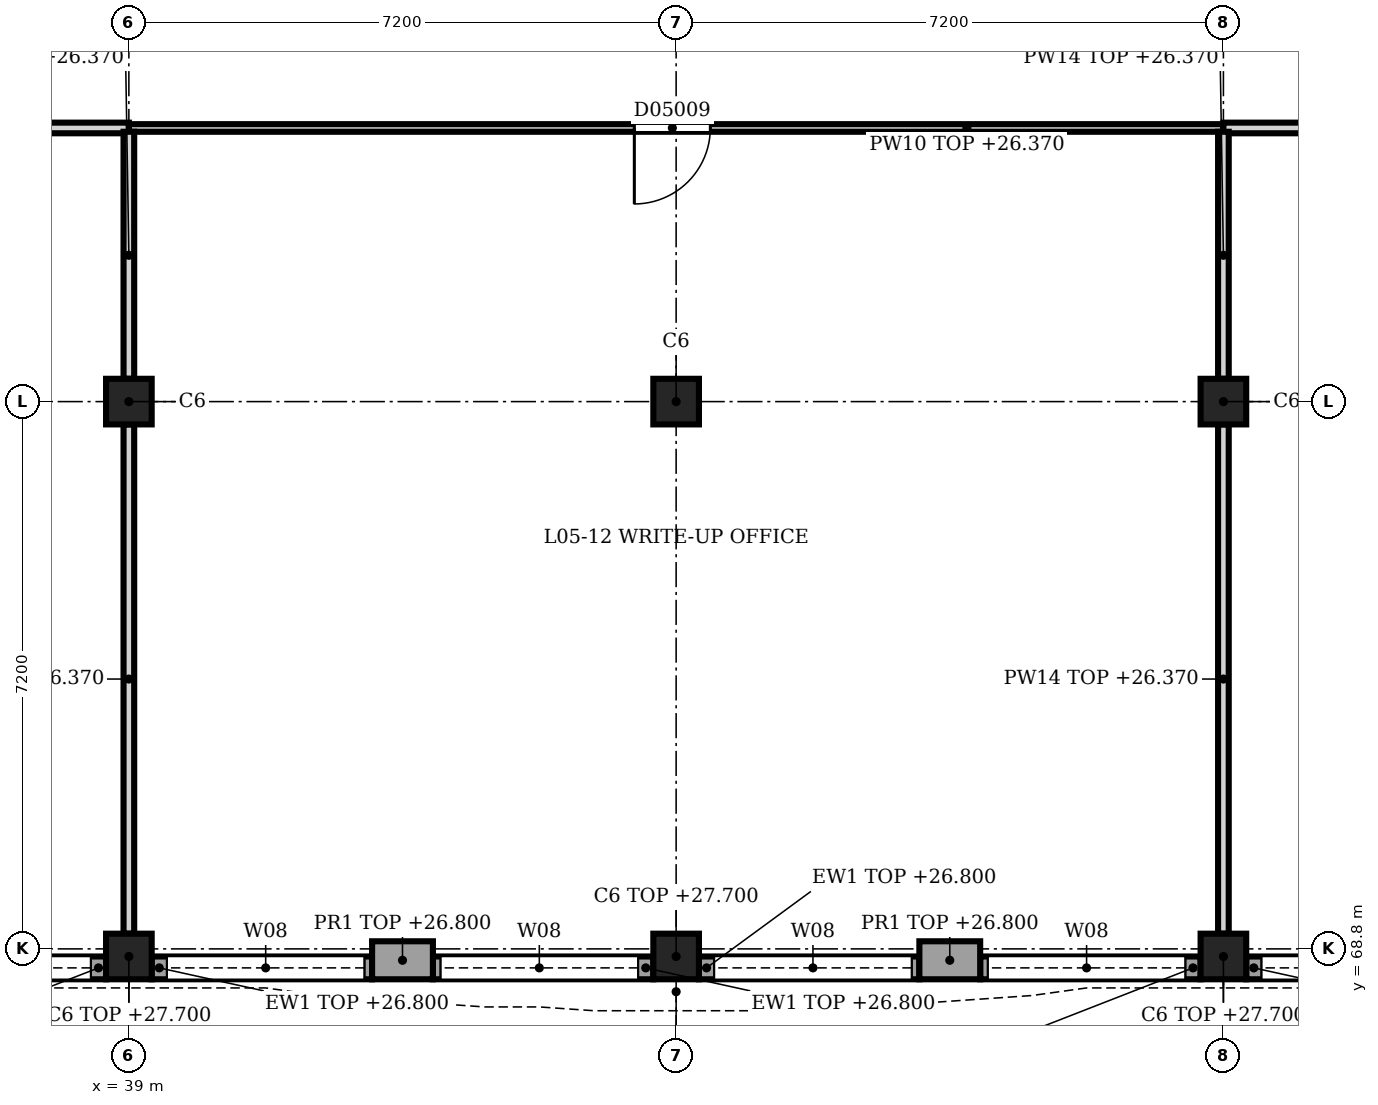
"""IFC4 building model, lengths in metres.
Left out: names, types, materials, properties, quantities, classifications, styles, units other than length and angle.
Written with IfcOpenShell. Run it as: python <this file> out.ifc"""

import sys

from ifc_helpers import new_model, si_unit, direction, frame, frame_2d, origin, origin_2d, place, context, subcontext, project, spatial, rectangle, extrude, element, fill, save


model = new_model("IFC4")
c1 = context("Model", 3, precision=1e-05, world=origin(), true_north=direction((0.0, 1.0)))
c2 = subcontext(c1, "Body", "Model", "MODEL_VIEW")
j1 = project(units=[si_unit("LENGTHUNIT", "METRE"), si_unit("PLANEANGLEUNIT", "RADIAN")], contexts=[c1])
p1 = place(None, origin())
s1 = spatial("IfcSite", under=j1, at=p1, CompositionType="ELEMENT")
p2 = place(p1, origin())
s2 = spatial("IfcBuilding", under=s1, at=p2, CompositionType="ELEMENT")
p3 = place(p2, frame((0.0, 0.0, 23.4)))
s3 = spatial("IfcBuildingStorey", under=s2, at=p3, CompositionType="ELEMENT", Elevation=23.4)
p4 = place(p3, frame((39.0, 68.7, 0.0), z_axis=(0.0, 0.0, 1.0), x_axis=(1.0, 0.0, 0.0)))
e1 = element("IfcColumn", 1, at=p4, inside=s3, PredefinedType="COLUMN", context=c2, shape_type="SweptSolid", body=[
    extrude(rectangle(XDim=0.6, YDim=0.6, at=origin_2d()), origin(), (0.0, 0.0, 1.0), 4.3),
])
p5 = place(p3, frame((39.0, 76.0, 0.0), z_axis=(0.0, 0.0, 1.0), x_axis=(1.0, 0.0, 0.0)))
e2 = element("IfcColumn", 2, at=p5, inside=s3, PredefinedType="COLUMN", context=c2, shape_type="SweptSolid", body=[
    extrude(rectangle(XDim=0.6, YDim=0.6, at=origin_2d()), origin(), (0.0, 0.0, 1.0), 4.5),
])
p6 = place(p3, frame((46.2, 68.7, 0.0), z_axis=(0.0, 0.0, 1.0), x_axis=(1.0, 0.0, 0.0)))
e3 = element("IfcColumn", 3, at=p6, inside=s3, PredefinedType="COLUMN", context=c2, shape_type="SweptSolid", body=[
    extrude(rectangle(XDim=0.6, YDim=0.6, at=origin_2d()), origin(), (0.0, 0.0, 1.0), 4.3),
])
p7 = place(p3, frame((46.2, 76.0, 0.0), z_axis=(0.0, 0.0, 1.0), x_axis=(1.0, 0.0, 0.0)))
e4 = element("IfcColumn", 4, at=p7, inside=s3, PredefinedType="COLUMN", context=c2, shape_type="SweptSolid", body=[
    extrude(rectangle(XDim=0.6, YDim=0.6, at=origin_2d()), origin(), (0.0, 0.0, 1.0), 4.5),
])
p8 = place(p3, frame((53.4, 68.7, 0.0), z_axis=(0.0, 0.0, 1.0), x_axis=(1.0, 0.0, 0.0)))
e5 = element("IfcColumn", 5, at=p8, inside=s3, PredefinedType="COLUMN", context=c2, shape_type="SweptSolid", body=[
    extrude(rectangle(XDim=0.6, YDim=0.6, at=origin_2d()), origin(), (0.0, 0.0, 1.0), 4.3),
])
p9 = place(p3, frame((53.4, 76.0, 0.0), z_axis=(0.0, 0.0, 1.0), x_axis=(1.0, 0.0, 0.0)))
e6 = element("IfcColumn", 6, at=p9, inside=s3, PredefinedType="COLUMN", context=c2, shape_type="SweptSolid", body=[
    extrude(rectangle(XDim=0.6, YDim=0.6, at=origin_2d()), origin(), (0.0, 0.0, 1.0), 4.5),
])
for number, where, z_axis, x_axis in (
    (7, (50.2, 68.65, 0.0), (0.0, 0.0, 1.0), (-1.0, 0.0, 0.0)),
    (8, (43.0, 68.65, 0.0), (0.0, 0.0, 1.0), (-1.0, 0.0, 0.0)),
):
    element("IfcWall", number, at=place(p3, frame(where, z_axis=z_axis, x_axis=x_axis)), inside=s3, PredefinedType="SOLIDWALL", context=c2, shape_type="SweptSolid", body=[
        extrude(rectangle(XDim=0.8, YDim=0.5, at=frame_2d((0.4, 0.0))), origin(), (0.0, 0.0, 1.0), 3.4),
    ])
p10 = place(p3, frame((56.6, 68.55, 0.0), z_axis=(0.0, 0.0, 1.0), x_axis=(-1.0, 0.0, 0.0)))
e9 = element("IfcWall", 9, at=p10, inside=s3, PredefinedType="SOLIDWALL", context=c2, shape_type="SweptSolid", body=[
    extrude(rectangle(XDim=2.9, YDim=0.3, at=frame_2d((1.45, 0.0))), origin(), (0.0, 0.0, 1.0), 3.4),
])
p11 = place(p10, frame((0.1, 0.0, 1.2)))
e10 = element("IfcOpeningElement", 10, at=p11, cuts=e9, PredefinedType="OPENING", context=c2, shape_type="SweptSolid", body=[
    extrude(rectangle(XDim=2.6, YDim=2.1, at=frame_2d((1.3, 1.05))), frame((0.0, 0.16, 0.0), z_axis=(0.0, -1.0, 0.0), x_axis=(1.0, 0.0, 0.0)), (0.0, 0.0, 1.0), 0.32),
])
p12 = place(p3, frame((53.1, 68.55, 0.0), z_axis=(0.0, 0.0, 1.0), x_axis=(-1.0, 0.0, 0.0)))
e11 = element("IfcWall", 11, at=p12, inside=s3, PredefinedType="SOLIDWALL", context=c2, shape_type="SweptSolid", body=[
    extrude(rectangle(XDim=2.9, YDim=0.3, at=frame_2d((1.45, 0.0))), origin(), (0.0, 0.0, 1.0), 3.4),
])
p13 = place(p12, frame((0.2, 0.0, 1.2)))
e12 = element("IfcOpeningElement", 12, at=p13, cuts=e11, PredefinedType="OPENING", context=c2, shape_type="SweptSolid", body=[
    extrude(rectangle(XDim=2.6, YDim=2.1, at=frame_2d((1.3, 1.05))), frame((0.0, 0.16, 0.0), z_axis=(0.0, -1.0, 0.0), x_axis=(1.0, 0.0, 0.0)), (0.0, 0.0, 1.0), 0.32),
])
p14 = place(p3, frame((49.4, 68.55, 0.0), z_axis=(0.0, 0.0, 1.0), x_axis=(-1.0, 0.0, 0.0)))
e13 = element("IfcWall", 13, at=p14, inside=s3, PredefinedType="SOLIDWALL", context=c2, shape_type="SweptSolid", body=[
    extrude(rectangle(XDim=2.9, YDim=0.3, at=frame_2d((1.45, 0.0))), origin(), (0.0, 0.0, 1.0), 3.4),
])
p15 = place(p14, frame((0.1, 0.0, 1.2)))
e14 = element("IfcOpeningElement", 14, at=p15, cuts=e13, PredefinedType="OPENING", context=c2, shape_type="SweptSolid", body=[
    extrude(rectangle(XDim=2.6, YDim=2.1, at=frame_2d((1.3, 1.05))), frame((0.0, 0.16, 0.0), z_axis=(0.0, -1.0, 0.0), x_axis=(1.0, 0.0, 0.0)), (0.0, 0.0, 1.0), 0.32),
])
p16 = place(p3, frame((45.9, 68.55, 0.0), z_axis=(0.0, 0.0, 1.0), x_axis=(-1.0, 0.0, 0.0)))
e15 = element("IfcWall", 15, at=p16, inside=s3, PredefinedType="SOLIDWALL", context=c2, shape_type="SweptSolid", body=[
    extrude(rectangle(XDim=2.9, YDim=0.3, at=frame_2d((1.45, 0.0))), origin(), (0.0, 0.0, 1.0), 3.4),
])
p17 = place(p16, frame((0.2, 0.0, 1.2)))
e16 = element("IfcOpeningElement", 16, at=p17, cuts=e15, PredefinedType="OPENING", context=c2, shape_type="SweptSolid", body=[
    extrude(rectangle(XDim=2.6, YDim=2.1, at=frame_2d((1.3, 1.05))), frame((0.0, 0.16, 0.0), z_axis=(0.0, -1.0, 0.0), x_axis=(1.0, 0.0, 0.0)), (0.0, 0.0, 1.0), 0.32),
])
p18 = place(p3, frame((42.2, 68.55, 0.0), z_axis=(0.0, 0.0, 1.0), x_axis=(-1.0, 0.0, 0.0)))
e17 = element("IfcWall", 17, at=p18, inside=s3, PredefinedType="SOLIDWALL", context=c2, shape_type="SweptSolid", body=[
    extrude(rectangle(XDim=2.9, YDim=0.3, at=frame_2d((1.45, 0.0))), origin(), (0.0, 0.0, 1.0), 3.4),
])
p19 = place(p18, frame((0.1, 0.0, 1.2)))
e18 = element("IfcOpeningElement", 18, at=p19, cuts=e17, PredefinedType="OPENING", context=c2, shape_type="SweptSolid", body=[
    extrude(rectangle(XDim=2.6, YDim=2.1, at=frame_2d((1.3, 1.05))), frame((0.0, 0.16, 0.0), z_axis=(0.0, -1.0, 0.0), x_axis=(1.0, 0.0, 0.0)), (0.0, 0.0, 1.0), 0.32),
])
p20 = place(p3, frame((38.7, 68.55, 0.0), z_axis=(0.0, 0.0, 1.0), x_axis=(-1.0, 0.0, 0.0)))
e19 = element("IfcWall", 19, at=p20, inside=s3, PredefinedType="SOLIDWALL", context=c2, shape_type="SweptSolid", body=[
    extrude(rectangle(XDim=2.9, YDim=0.3, at=frame_2d((1.45, 0.0))), origin(), (0.0, 0.0, 1.0), 3.4),
])
p21 = place(p20, frame((0.2, 0.0, 1.2)))
e20 = element("IfcOpeningElement", 20, at=p21, cuts=e19, PredefinedType="OPENING", context=c2, shape_type="SweptSolid", body=[
    extrude(rectangle(XDim=2.6, YDim=2.1, at=frame_2d((1.3, 1.05))), frame((0.0, 0.16, 0.0), z_axis=(0.0, -1.0, 0.0), x_axis=(1.0, 0.0, 0.0)), (0.0, 0.0, 1.0), 0.32),
])
p22 = place(p3, frame((39.0, 79.6, 0.0), z_axis=(0.0, 0.0, 1.0), x_axis=(-1.0, 0.0, 0.0)))
e21 = element("IfcWall", 21, at=p22, inside=s3, PredefinedType="PARTITIONING", context=c2, shape_type="SweptSolid", body=[
    extrude(rectangle(XDim=18.0, YDim=0.14, at=frame_2d((9.0, 0.0))), origin(), (0.0, 0.0, 1.0), 2.97),
])
p23 = place(p22, frame((8.45, 0.0, 0.0)))
e22 = element("IfcOpeningElement", 22, at=p23, cuts=e21, PredefinedType="OPENING", context=c2, shape_type="SweptSolid", body=[
    extrude(rectangle(XDim=1.2, YDim=2.1, at=frame_2d((0.6, 1.05))), frame((0.0, 0.08, 0.0), z_axis=(0.0, -1.0, 0.0), x_axis=(1.0, 0.0, 0.0)), (0.0, 0.0, 1.0), 0.16),
])
p24 = place(p3, frame((53.4, 79.6, 0.0), z_axis=(0.0, 0.0, 1.0), x_axis=(-1.0, 0.0, 0.0)))
e23 = element("IfcWall", 23, at=p24, inside=s3, PredefinedType="PARTITIONING", context=c2, shape_type="SweptSolid", body=[
    extrude(rectangle(XDim=14.4, YDim=0.1, at=frame_2d((7.2, 0.0))), origin(), (0.0, 0.0, 1.0), 2.97),
])
p25 = place(p24, frame((6.75, 0.0, 0.0)))
e24 = element("IfcOpeningElement", 24, at=p25, cuts=e23, PredefinedType="OPENING", context=c2, shape_type="SweptSolid", body=[
    extrude(rectangle(XDim=1.0, YDim=2.1, at=frame_2d((0.5, 1.05))), frame((0.0, 0.06, 0.0), z_axis=(0.0, -1.0, 0.0), x_axis=(1.0, 0.0, 0.0)), (0.0, 0.0, 1.0), 0.12),
])
p26 = place(p3, frame((67.8, 79.6, 0.0), z_axis=(0.0, 0.0, 1.0), x_axis=(-1.0, 0.0, 0.0)))
e25 = element("IfcWall", 25, at=p26, inside=s3, PredefinedType="PARTITIONING", context=c2, shape_type="SweptSolid", body=[
    extrude(rectangle(XDim=14.4, YDim=0.14, at=frame_2d((7.2, 0.0))), origin(), (0.0, 0.0, 1.0), 2.97),
])
p27 = place(p26, frame((6.65, 0.0, 0.0)))
e26 = element("IfcOpeningElement", 26, at=p27, cuts=e25, PredefinedType="OPENING", context=c2, shape_type="SweptSolid", body=[
    extrude(rectangle(XDim=1.2, YDim=2.1, at=frame_2d((0.6, 1.05))), frame((0.0, 0.08, 0.0), z_axis=(0.0, -1.0, 0.0), x_axis=(1.0, 0.0, 0.0)), (0.0, 0.0, 1.0), 0.16),
])
p28 = place(p3, frame((39.0, 69.0, 0.0), z_axis=(0.0, 0.0, 1.0), x_axis=(0.0, 1.0, 0.0)))
e27 = element("IfcWall", 27, at=p28, inside=s3, PredefinedType="PARTITIONING", context=c2, shape_type="SweptSolid", body=[
    extrude(rectangle(XDim=6.7, YDim=0.14, at=frame_2d((3.35, 0.0))), origin(), (0.0, 0.0, 1.0), 2.97),
])
p29 = place(p3, frame((39.0, 76.3, 0.0), z_axis=(0.0, 0.0, 1.0), x_axis=(0.0, 1.0, 0.0)))
e28 = element("IfcWall", 28, at=p29, inside=s3, PredefinedType="PARTITIONING", context=c2, shape_type="SweptSolid", body=[
    extrude(rectangle(XDim=3.25, YDim=0.14, at=frame_2d((1.625, 0.0))), origin(), (0.0, 0.0, 1.0), 2.97),
])
p30 = place(p3, frame((53.4, 69.0, 0.0), z_axis=(0.0, 0.0, 1.0), x_axis=(0.0, 1.0, 0.0)))
e29 = element("IfcWall", 29, at=p30, inside=s3, PredefinedType="PARTITIONING", context=c2, shape_type="SweptSolid", body=[
    extrude(rectangle(XDim=6.7, YDim=0.14, at=frame_2d((3.35, 0.0))), origin(), (0.0, 0.0, 1.0), 2.97),
])
p31 = place(p3, frame((53.4, 76.3, 0.0), z_axis=(0.0, 0.0, 1.0), x_axis=(0.0, 1.0, 0.0)))
e30 = element("IfcWall", 30, at=p31, inside=s3, PredefinedType="PARTITIONING", context=c2, shape_type="SweptSolid", body=[
    extrude(rectangle(XDim=3.25, YDim=0.14, at=frame_2d((1.625, 0.0))), origin(), (0.0, 0.0, 1.0), 2.97),
])
p32 = place(p11, origin())
e31 = element("IfcWindow", 31, at=p32, inside=s3, PartitioningType="SINGLE_PANEL", PredefinedType="WINDOW", context=c2, shape_type="SweptSolid", body=[
    extrude(rectangle(XDim=2.6, YDim=2.1, at=frame_2d((1.3, 1.05))), frame((0.0, 0.03, 0.0), z_axis=(0.0, -1.0, 0.0), x_axis=(1.0, 0.0, 0.0)), (0.0, 0.0, 1.0), 0.06),
])
fill(e10, e31)
p33 = place(p13, origin())
e32 = element("IfcWindow", 32, at=p33, inside=s3, PartitioningType="SINGLE_PANEL", PredefinedType="WINDOW", context=c2, shape_type="SweptSolid", body=[
    extrude(rectangle(XDim=2.6, YDim=2.1, at=frame_2d((1.3, 1.05))), frame((0.0, 0.03, 0.0), z_axis=(0.0, -1.0, 0.0), x_axis=(1.0, 0.0, 0.0)), (0.0, 0.0, 1.0), 0.06),
])
fill(e12, e32)
p34 = place(p15, origin())
e33 = element("IfcWindow", 33, at=p34, inside=s3, PartitioningType="SINGLE_PANEL", PredefinedType="WINDOW", context=c2, shape_type="SweptSolid", body=[
    extrude(rectangle(XDim=2.6, YDim=2.1, at=frame_2d((1.3, 1.05))), frame((0.0, 0.03, 0.0), z_axis=(0.0, -1.0, 0.0), x_axis=(1.0, 0.0, 0.0)), (0.0, 0.0, 1.0), 0.06),
])
fill(e14, e33)
p35 = place(p17, origin())
e34 = element("IfcWindow", 34, at=p35, inside=s3, PartitioningType="SINGLE_PANEL", PredefinedType="WINDOW", context=c2, shape_type="SweptSolid", body=[
    extrude(rectangle(XDim=2.6, YDim=2.1, at=frame_2d((1.3, 1.05))), frame((0.0, 0.03, 0.0), z_axis=(0.0, -1.0, 0.0), x_axis=(1.0, 0.0, 0.0)), (0.0, 0.0, 1.0), 0.06),
])
fill(e16, e34)
p36 = place(p19, origin())
e35 = element("IfcWindow", 35, at=p36, inside=s3, PartitioningType="SINGLE_PANEL", PredefinedType="WINDOW", context=c2, shape_type="SweptSolid", body=[
    extrude(rectangle(XDim=2.6, YDim=2.1, at=frame_2d((1.3, 1.05))), frame((0.0, 0.03, 0.0), z_axis=(0.0, -1.0, 0.0), x_axis=(1.0, 0.0, 0.0)), (0.0, 0.0, 1.0), 0.06),
])
fill(e18, e35)
p37 = place(p21, origin())
e36 = element("IfcWindow", 36, at=p37, inside=s3, PartitioningType="SINGLE_PANEL", PredefinedType="WINDOW", context=c2, shape_type="SweptSolid", body=[
    extrude(rectangle(XDim=2.6, YDim=2.1, at=frame_2d((1.3, 1.05))), frame((0.0, 0.03, 0.0), z_axis=(0.0, -1.0, 0.0), x_axis=(1.0, 0.0, 0.0)), (0.0, 0.0, 1.0), 0.06),
])
fill(e20, e36)
p38 = place(p25, origin())
e37 = element("IfcDoor", 37, at=p38, inside=s3, OperationType="SINGLE_SWING_RIGHT", PredefinedType="DOOR", context=c2, shape_type="SweptSolid", body=[
    extrude(rectangle(XDim=1.0, YDim=2.1, at=frame_2d((0.5, 1.05))), frame((0.0, 0.025, 0.0), z_axis=(0.0, -1.0, 0.0), x_axis=(1.0, 0.0, 0.0)), (0.0, 0.0, 1.0), 0.05),
])
fill(e24, e37)
save(model, sys.argv[1])
